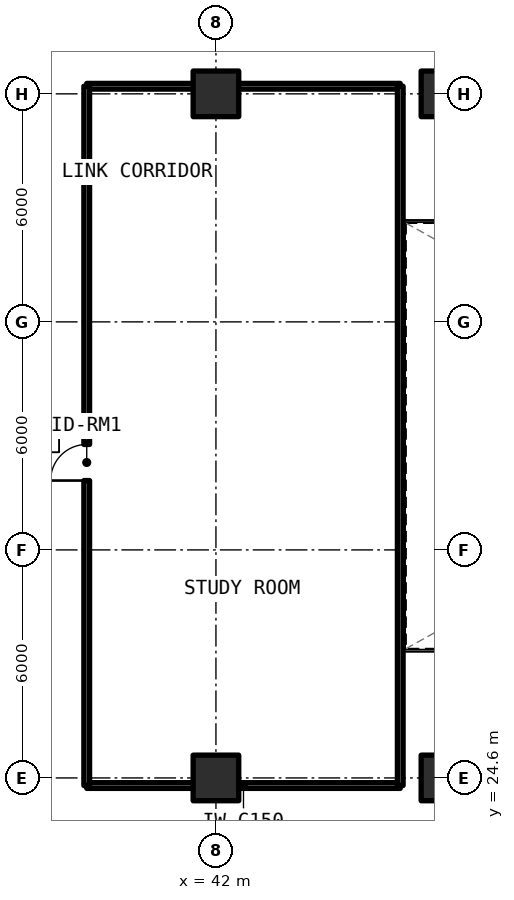
"""IFC4 building model, lengths in metres.
Left out: names, types, materials, properties, quantities, classifications, styles, units other than length and angle.
Written with IfcOpenShell. Run it as: python <this file> out.ifc"""

import sys

from ifc_helpers import new_model, si_unit, direction, frame, frame_2d, origin, origin_2d, place, context, subcontext, project, spatial, rectangle, extrude, element, fill, save


model = new_model("IFC4")
c1 = context("Model", 3, precision=1e-05, world=origin(), true_north=direction((0.0, 1.0)))
c2 = subcontext(c1, "Body", "Model", "MODEL_VIEW")
j1 = project(units=[si_unit("LENGTHUNIT", "METRE"), si_unit("PLANEANGLEUNIT", "RADIAN")], contexts=[c1])
p1 = place(None, origin())
s1 = spatial("IfcSite", under=j1, at=p1, CompositionType="ELEMENT")
p2 = place(p1, origin())
s2 = spatial("IfcBuilding", under=s1, at=p2, CompositionType="ELEMENT")
p3 = place(p2, frame((0.0, 0.0, 48.84)))
s3 = spatial("IfcBuildingStorey", under=s2, at=p3, CompositionType="ELEMENT", Elevation=48.84)
for number, where, z_axis, x_axis in (
    (1, (42.0, 24.6, 0.0), (0.0, 0.0, 1.0), (1.0, 0.0, 0.0)),
    (2, (42.0, 42.6, 0.0), (0.0, 0.0, 1.0), (1.0, 0.0, 0.0)),
    (3, (48.0, 24.6, 0.0), (0.0, 0.0, 1.0), (1.0, 0.0, 0.0)),
    (4, (48.0, 42.6, 0.0), (0.0, 0.0, 1.0), (1.0, 0.0, 0.0)),
):
    element("IfcColumn", number, at=place(p3, frame(where, z_axis=z_axis, x_axis=x_axis)), inside=s3, PredefinedType="COLUMN", context=c2, shape_type="SweptSolid", body=[
        extrude(rectangle(XDim=1.2, YDim=1.2, at=origin_2d()), origin(), (0.0, 0.0, 1.0), 3.3),
    ])
for number, where, z_axis, x_axis in (
    (5, (38.6, 24.4, 0.0), (0.0, 0.0, 1.0), (1.0, 0.0, 0.0)),
    (6, (38.6, 42.8, 0.0), (0.0, 0.0, 1.0), (1.0, 0.0, 0.0)),
):
    element("IfcWall", number, at=place(p3, frame(where, z_axis=z_axis, x_axis=x_axis)), inside=s3, PredefinedType="SOLIDWALL", context=c2, shape_type="SweptSolid", body=[
        extrude(rectangle(XDim=8.25, YDim=0.15, at=frame_2d((4.125, 0.0))), origin(), (0.0, 0.0, 1.0), 2.295),
    ])
p4 = place(p3, frame((38.6, 24.4, 0.0), z_axis=(0.0, 0.0, 1.0), x_axis=(0.0, 1.0, 0.0)))
e7 = element("IfcWall", 7, at=p4, inside=s3, PredefinedType="SOLIDWALL", context=c2, shape_type="SweptSolid", body=[
    extrude(rectangle(XDim=18.4, YDim=0.15, at=frame_2d((9.2, 0.0))), origin(), (0.0, 0.0, 1.0), 2.35),
])
p5 = place(p4, frame((8.025, 0.0, 0.0)))
e8 = element("IfcOpeningElement", 8, at=p5, cuts=e7, PredefinedType="OPENING", context=c2, shape_type="SweptSolid", body=[
    extrude(rectangle(XDim=0.95, YDim=2.15, at=frame_2d((0.475, 1.075))), frame((0.0, 0.085, 0.0), z_axis=(0.0, -1.0, 0.0), x_axis=(1.0, 0.0, 0.0)), (0.0, 0.0, 1.0), 0.17),
])
p6 = place(p3, frame((46.85, 24.4, 0.0), z_axis=(0.0, 0.0, 1.0), x_axis=(0.0, 1.0, 0.0)))
e9 = element("IfcWall", 9, at=p6, inside=s3, PredefinedType="SOLIDWALL", context=c2, shape_type="SweptSolid", body=[
    extrude(rectangle(XDim=18.4, YDim=0.15, at=frame_2d((9.2, 0.0))), origin(), (0.0, 0.0, 1.0), 2.35),
])
p7 = place(p5, origin())
e10 = element("IfcDoor", 10, at=p7, inside=s3, OperationType="SINGLE_SWING_LEFT", PredefinedType="DOOR", context=c2, shape_type="SweptSolid", body=[
    extrude(rectangle(XDim=0.95, YDim=2.15, at=frame_2d((0.475, 1.075))), frame((0.0, 0.025, 0.0), z_axis=(0.0, -1.0, 0.0), x_axis=(1.0, 0.0, 0.0)), (0.0, 0.0, 1.0), 0.05),
])
fill(e8, e10)
save(model, sys.argv[1])
